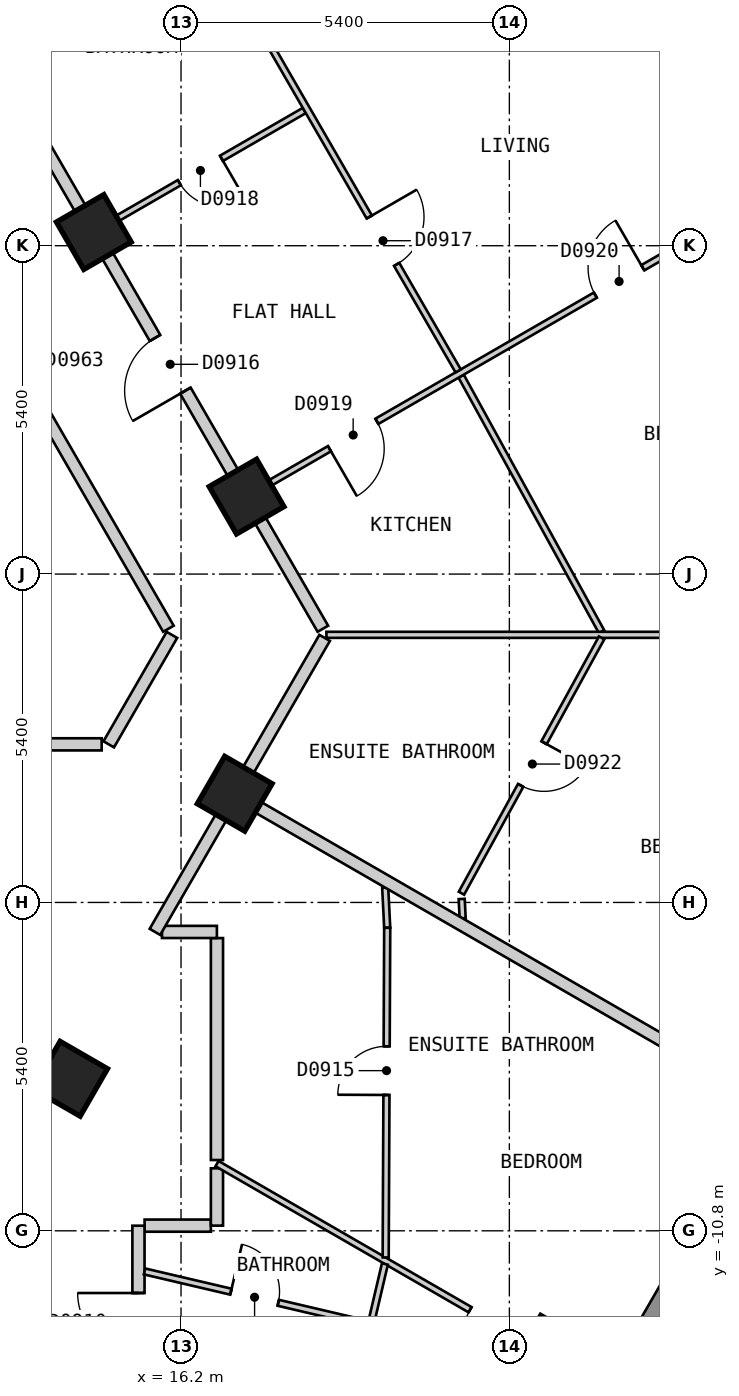
"""IFC4 building model, lengths in metres.
Left out: names, types, materials, properties, quantities, classifications, styles, units other than length and angle.
Written with IfcOpenShell. Run it as: python <this file> out.ifc"""

import sys

from ifc_helpers import new_model, si_unit, direction, frame, frame_2d, origin, origin_2d, place, context, subcontext, project, spatial, polyline, rectangle, outline, extrude, element, fill, save


model = new_model("IFC4")
c1 = context("Model", 3, precision=1e-05, world=origin(), true_north=direction((0.0, 1.0)))
c2 = subcontext(c1, "Body", "Model", "MODEL_VIEW")
j1 = project(units=[si_unit("LENGTHUNIT", "METRE"), si_unit("PLANEANGLEUNIT", "RADIAN")], contexts=[c1])
p1 = place(None, origin())
s1 = spatial("IfcSite", under=j1, at=p1, CompositionType="ELEMENT")
p2 = place(p1, origin())
s2 = spatial("IfcBuilding", under=s1, at=p2, CompositionType="ELEMENT")
p3 = place(p2, frame((0.0, 0.0, 90.0)))
s3 = spatial("IfcBuildingStorey", under=s2, at=p3, CompositionType="ELEMENT", Elevation=90.0)
p4 = place(p3, frame((22.3, -12.875, 0.0), z_axis=(0.0, 0.0, 1.0), x_axis=(0.5, 0.866025403784, 0.0)))
e1 = element("IfcColumn", 1, at=p4, inside=s3, PredefinedType="COLUMN", context=c2, shape_type="SweptSolid", body=[
    extrude(rectangle(XDim=1.0, YDim=1.0, at=origin_2d()), origin(), (0.0, 0.0, 1.0), 3.0),
])
for number, where, z_axis, x_axis in (
    (2, (14.376, -8.3, 0.0), (0.0, 0.0, 1.0), (0.5, 0.866, 0.0)),
    (3, (17.083, -3.612, 0.0), (0.0, 0.0, 1.0), (0.5, 0.866, 0.0)),
    (4, (17.278, 1.274, 0.0), (0.0, 0.0, 1.0), (-0.5, 0.866, 0.0)),
    (5, (14.766, 5.625, 0.0), (0.0, 0.0, 1.0), (-0.5, 0.866, 0.0)),
):
    element("IfcColumn", number, at=place(p3, frame(where, z_axis=z_axis, x_axis=x_axis)), inside=s3, PredefinedType="COLUMN", context=c2, shape_type="SweptSolid", body=[
        extrude(rectangle(XDim=0.9, YDim=0.9, at=origin_2d()), origin(), (0.0, 0.0, 1.0), 3.0),
    ])
p5 = place(p3, frame((17.479, -23.425, 0.0), z_axis=(0.0, 0.0, 1.0), x_axis=(0.500035407905, 0.866004960056, 0.0)))
e6 = element("IfcWall", 6, at=p5, inside=s3, PredefinedType="SOLIDWALL", context=c2, shape_type="SweptSolid", body=[
    extrude(outline(polyline([(0.0, -0.15), (23.094, -0.15), (23.014, 0.15), (0.08, 0.15), (0.0, -0.15)])), origin(), (0.0, 0.0, 1.0), 2.7),
])
p6 = place(p5, frame((2.677, 0.0, 0.15)))
e7 = element("IfcOpeningElement", 7, at=p6, cuts=e6, PredefinedType="OPENING", context=c2, shape_type="SweptSolid", body=[
    extrude(rectangle(XDim=1.5, YDim=2.1, at=frame_2d((0.75, 1.05))), frame((0.0, 0.16, 0.0), z_axis=(0.0, -1.0, 0.0), x_axis=(1.0, 0.0, 0.0)), (0.0, 0.0, 1.0), 0.32),
])
p7 = place(p5, frame((8.091, 0.0, 0.15)))
e8 = element("IfcOpeningElement", 8, at=p7, cuts=e6, PredefinedType="OPENING", context=c2, shape_type="SweptSolid", body=[
    extrude(rectangle(XDim=1.5, YDim=2.1, at=frame_2d((0.75, 1.05))), frame((0.0, 0.16, 0.0), z_axis=(0.0, -1.0, 0.0), x_axis=(1.0, 0.0, 0.0)), (0.0, 0.0, 1.0), 0.32),
])
p8 = place(p5, frame((13.504, 0.0, 0.15)))
e9 = element("IfcOpeningElement", 9, at=p8, cuts=e6, PredefinedType="OPENING", context=c2, shape_type="SweptSolid", body=[
    extrude(rectangle(XDim=1.5, YDim=2.1, at=frame_2d((0.75, 1.05))), frame((0.0, 0.16, 0.0), z_axis=(0.0, -1.0, 0.0), x_axis=(1.0, 0.0, 0.0)), (0.0, 0.0, 1.0), 0.32),
])
p9 = place(p5, frame((18.917, 0.0, 0.15)))
e10 = element("IfcOpeningElement", 10, at=p9, cuts=e6, PredefinedType="OPENING", context=c2, shape_type="SweptSolid", body=[
    extrude(rectangle(XDim=1.5, YDim=2.1, at=frame_2d((0.75, 1.05))), frame((0.0, 0.16, 0.0), z_axis=(0.0, -1.0, 0.0), x_axis=(1.0, 0.0, 0.0)), (0.0, 0.0, 1.0), 0.32),
])
p10 = place(p3, frame((29.027, 1.425, 0.0), z_axis=(0.0, 0.0, 1.0), x_axis=(-0.500027479704, 0.866009537788, 0.0)))
e11 = element("IfcWall", 11, at=p10, inside=s3, PredefinedType="SOLIDWALL", context=c2, shape_type="SweptSolid", body=[
    extrude(outline(polyline([(0.0, -0.15), (26.559, -0.15), (26.478, 0.15), (0.08, 0.15), (0.0, -0.15)])), origin(), (0.0, 0.0, 1.0), 2.7),
])
p11 = place(p10, frame((2.483, 0.0, 0.15)))
e12 = element("IfcOpeningElement", 12, at=p11, cuts=e11, PredefinedType="OPENING", context=c2, shape_type="SweptSolid", body=[
    extrude(rectangle(XDim=1.5, YDim=2.1, at=frame_2d((0.75, 1.05))), frame((0.0, 0.16, 0.0), z_axis=(0.0, -1.0, 0.0), x_axis=(1.0, 0.0, 0.0)), (0.0, 0.0, 1.0), 0.32),
])
p12 = place(p10, frame((7.506, 0.0, 0.15)))
e13 = element("IfcOpeningElement", 13, at=p12, cuts=e11, PredefinedType="OPENING", context=c2, shape_type="SweptSolid", body=[
    extrude(rectangle(XDim=1.5, YDim=2.1, at=frame_2d((0.75, 1.05))), frame((0.0, 0.16, 0.0), z_axis=(0.0, -1.0, 0.0), x_axis=(1.0, 0.0, 0.0)), (0.0, 0.0, 1.0), 0.32),
])
p13 = place(p10, frame((12.529, 0.0, 0.15)))
e14 = element("IfcOpeningElement", 14, at=p13, cuts=e11, PredefinedType="OPENING", context=c2, shape_type="SweptSolid", body=[
    extrude(rectangle(XDim=1.5, YDim=2.1, at=frame_2d((0.75, 1.05))), frame((0.0, 0.16, 0.0), z_axis=(0.0, -1.0, 0.0), x_axis=(1.0, 0.0, 0.0)), (0.0, 0.0, 1.0), 0.32),
])
p14 = place(p10, frame((17.552, 0.0, 0.15)))
e15 = element("IfcOpeningElement", 15, at=p14, cuts=e11, PredefinedType="OPENING", context=c2, shape_type="SweptSolid", body=[
    extrude(rectangle(XDim=1.5, YDim=2.1, at=frame_2d((0.75, 1.05))), frame((0.0, 0.16, 0.0), z_axis=(0.0, -1.0, 0.0), x_axis=(1.0, 0.0, 0.0)), (0.0, 0.0, 1.0), 0.32),
])
p15 = place(p10, frame((22.575, 0.0, 0.15)))
e16 = element("IfcOpeningElement", 16, at=p15, cuts=e11, PredefinedType="OPENING", context=c2, shape_type="SweptSolid", body=[
    extrude(rectangle(XDim=1.5, YDim=2.1, at=frame_2d((0.75, 1.05))), frame((0.0, 0.16, 0.0), z_axis=(0.0, -1.0, 0.0), x_axis=(1.0, 0.0, 0.0)), (0.0, 0.0, 1.0), 0.32),
])
p16 = place(p3, frame((10.913, 7.899, 0.0), z_axis=(0.0, 0.0, 1.0), x_axis=(0.500028940566, -0.866008694296, 0.0)))
e17 = element("IfcWall", 17, at=p16, inside=s3, PredefinedType="PARTITIONING", context=c2, shape_type="SweptSolid", body=[
    extrude(rectangle(XDim=10.159, YDim=0.2, at=frame_2d((5.08, 0.0))), origin(), (0.0, 0.0, 1.0), 2.7),
])
p17 = place(p16, frame((4.63, 0.0, 0.0)))
e18 = element("IfcOpeningElement", 18, at=p17, cuts=e17, PredefinedType="OPENING", context=c2, shape_type="SweptSolid", body=[
    extrude(rectangle(XDim=0.9, YDim=2.1, at=frame_2d((0.45, 1.05))), frame((0.0, 0.11, 0.0), z_axis=(0.0, -1.0, 0.0), x_axis=(1.0, 0.0, 0.0)), (0.0, 0.0, 1.0), 0.22),
])
p18 = place(p3, frame((8.488, 16.5, 0.0), z_axis=(0.0, 0.0, 1.0), x_axis=(0.499986836607, -0.86603300354, 0.0)))
e19 = element("IfcWall", 19, at=p18, inside=s3, PredefinedType="PARTITIONING", context=c2, shape_type="SweptSolid", body=[
    extrude(rectangle(XDim=20.09, YDim=0.2, at=frame_2d((10.045, 0.0))), origin(), (0.0, 0.0, 1.0), 2.7),
])
p19 = place(p18, frame((14.569, 0.0, 0.0)))
e20 = element("IfcOpeningElement", 20, at=p19, cuts=e19, PredefinedType="OPENING", context=c2, shape_type="SweptSolid", body=[
    extrude(rectangle(XDim=1.0, YDim=2.1, at=frame_2d((0.5, 1.05))), frame((0.0, 0.11, 0.0), z_axis=(0.0, -1.0, 0.0), x_axis=(1.0, 0.0, 0.0)), (0.0, 0.0, 1.0), 0.22),
])
p20 = place(p18, frame((4.547, 0.0, 0.0)))
e21 = element("IfcOpeningElement", 21, at=p20, cuts=e19, PredefinedType="OPENING", context=c2, shape_type="SweptSolid", body=[
    extrude(rectangle(XDim=1.0, YDim=2.1, at=frame_2d((0.5, 1.05))), frame((0.0, 0.11, 0.0), z_axis=(0.0, -1.0, 0.0), x_axis=(1.0, 0.0, 0.0)), (0.0, 0.0, 1.0), 0.22),
])
p21 = place(p3, frame((16.791, -5.986, 0.0), z_axis=(0.0, 0.0, 1.0), x_axis=(0.0, -1.0, 0.0)))
e22 = element("IfcWall", 22, at=p21, inside=s3, PredefinedType="PARTITIONING", context=c2, shape_type="SweptSolid", body=[
    extrude(rectangle(XDim=3.65, YDim=0.2, at=frame_2d((1.825, 0.0))), origin(), (0.0, 0.0, 1.0), 2.7),
])
p22 = place(p3, frame((15.887, -5.885, 0.0), z_axis=(0.0, 0.0, 1.0), x_axis=(1.0, 0.0, 0.0)))
e23 = element("IfcWall", 23, at=p22, inside=s3, PredefinedType="PARTITIONING", context=c2, shape_type="SweptSolid", body=[
    extrude(rectangle(XDim=0.903, YDim=0.2, at=frame_2d((0.452, 0.0))), origin(), (0.0, 0.0, 1.0), 2.7),
])
p23 = place(p3, frame((15.601, -10.715, 0.0), z_axis=(0.0, 0.0, 1.0), x_axis=(1.0, 0.0, 0.0)))
e24 = element("IfcWall", 24, at=p23, inside=s3, PredefinedType="PARTITIONING", context=c2, shape_type="SweptSolid", body=[
    extrude(rectangle(XDim=1.09, YDim=0.2, at=frame_2d((0.545, 0.0))), origin(), (0.0, 0.0, 1.0), 2.7),
])
p24 = place(p3, frame((6.929, -2.8, 0.0), z_axis=(0.0, 0.0, 1.0), x_axis=(1.0, 0.0, 0.0)))
e25 = element("IfcWall", 25, at=p24, inside=s3, PredefinedType="PARTITIONING", context=c2, shape_type="SweptSolid", body=[
    extrude(rectangle(XDim=7.966, YDim=0.2, at=frame_2d((3.983, 0.0))), origin(), (0.0, 0.0, 1.0), 2.7),
])
p25 = place(p3, frame((15.011, -2.8, 0.0), z_axis=(0.0, 0.0, 1.0), x_axis=(0.499929208183, 0.866066271601, 0.0)))
e26 = element("IfcWall", 26, at=p25, inside=s3, PredefinedType="PARTITIONING", context=c2, shape_type="SweptSolid", body=[
    extrude(rectangle(XDim=2.078, YDim=0.2, at=frame_2d((1.039, 0.0))), origin(), (0.0, 0.0, 1.0), 2.7),
])
p26 = place(p3, frame((15.771, -5.884, 0.0), z_axis=(0.0, 0.0, 1.0), x_axis=(0.499939494019, 0.866060334111, 0.0)))
e27 = element("IfcWall", 27, at=p26, inside=s3, PredefinedType="PARTITIONING", context=c2, shape_type="SweptSolid", body=[
    extrude(rectangle(XDim=5.583, YDim=0.2, at=frame_2d((2.792, 0.0))), origin(), (0.0, 0.0, 1.0), 2.7),
])
p27 = place(p3, frame((15.5, -13.136, 0.0), z_axis=(0.0, 0.0, 1.0), x_axis=(0.0, 1.0, 0.0)))
e28 = element("IfcWall", 28, at=p27, inside=s3, PredefinedType="PARTITIONING", context=c2, shape_type="SweptSolid", body=[
    extrude(rectangle(XDim=2.42, YDim=0.2, at=frame_2d((1.21, 0.0))), origin(), (0.0, 0.0, 1.0), 2.7),
])
p28 = place(p27, frame((0.313, 0.0, 0.0)))
e29 = element("IfcOpeningElement", 29, at=p28, cuts=e28, PredefinedType="OPENING", context=c2, shape_type="SweptSolid", body=[
    extrude(rectangle(XDim=1.0, YDim=2.1, at=frame_2d((0.5, 1.05))), frame((0.0, 0.11, 0.0), z_axis=(0.0, -1.0, 0.0), x_axis=(1.0, 0.0, 0.0)), (0.0, 0.0, 1.0), 0.22),
])
p29 = place(p3, frame((16.791, -10.715, 0.0), z_axis=(0.0, 0.0, 1.0), x_axis=(0.0, 1.0, 0.0)))
e30 = element("IfcWall", 30, at=p29, inside=s3, PredefinedType="PARTITIONING", context=c2, shape_type="SweptSolid", body=[
    extrude(rectangle(XDim=0.943, YDim=0.2, at=frame_2d((0.472, 0.0))), origin(), (0.0, 0.0, 1.0), 2.7),
])
p30 = place(p3, frame((20.807, 3.255, 0.0), z_axis=(0.0, 0.0, 1.0), x_axis=(0.481604009855, -0.876388942018, 0.0)))
e31 = element("IfcWall", 31, at=p30, inside=s3, PredefinedType="PARTITIONING", context=c2, shape_type="SweptSolid", body=[
    extrude(rectangle(XDim=4.795, YDim=0.1, at=frame_2d((2.397, 0.0))), origin(), (0.0, 0.0, 1.0), 2.7),
])
p31 = place(p3, frame((19.558, -5.156, 0.0), z_axis=(0.0, 0.0, 1.0), x_axis=(0.04980880462, -0.998758771167, 0.0)))
e32 = element("IfcWall", 32, at=p31, inside=s3, PredefinedType="PARTITIONING", context=c2, shape_type="SweptSolid", body=[
    extrude(rectangle(XDim=0.662, YDim=0.1, at=frame_2d((0.331, 0.0))), origin(), (0.0, 0.0, 1.0), 2.7),
])
p32 = place(p3, frame((20.816, -5.343, 0.0), z_axis=(0.0, 0.0, 1.0), x_axis=(0.050626241319, -0.998717669659, 0.0)))
e33 = element("IfcWall", 33, at=p32, inside=s3, PredefinedType="PARTITIONING", context=c2, shape_type="SweptSolid", body=[
    extrude(rectangle(XDim=0.318, YDim=0.1, at=frame_2d((0.159, 0.0))), origin(), (0.0, 0.0, 1.0), 2.7),
])
p33 = place(p3, frame((15.6, -11.468, 0.0), z_axis=(0.0, 0.0, 1.0), x_axis=(0.973574036597, -0.228371616592, 0.0)))
e34 = element("IfcWall", 34, at=p33, inside=s3, PredefinedType="PARTITIONING", context=c2, shape_type="SweptSolid", body=[
    extrude(rectangle(XDim=3.771, YDim=0.1, at=frame_2d((1.885, 0.0))), origin(), (0.0, 0.0, 1.0), 2.7),
])
p34 = place(p33, frame((1.459, 0.0, 0.0)))
e35 = element("IfcOpeningElement", 35, at=p34, cuts=e34, PredefinedType="OPENING", context=c2, shape_type="SweptSolid", body=[
    extrude(rectangle(XDim=0.8, YDim=2.1, at=frame_2d((0.4, 1.05))), frame((0.0, 0.06, 0.0), z_axis=(0.0, -1.0, 0.0), x_axis=(1.0, 0.0, 0.0)), (0.0, 0.0, 1.0), 0.12),
])
p35 = place(p3, frame((16.792, -9.695, 0.0), z_axis=(0.0, 0.0, 1.0), x_axis=(0.86603765469, -0.499978780208, 0.0)))
e36 = element("IfcWall", 36, at=p35, inside=s3, PredefinedType="PARTITIONING", context=c2, shape_type="SweptSolid", body=[
    extrude(rectangle(XDim=7.31, YDim=0.1, at=frame_2d((3.655, 0.0))), origin(), (0.0, 0.0, 1.0), 2.7),
])
p36 = place(p35, frame((4.806, 0.0, 0.0)))
e37 = element("IfcOpeningElement", 37, at=p36, cuts=e36, PredefinedType="OPENING", context=c2, shape_type="SweptSolid", body=[
    extrude(rectangle(XDim=0.9, YDim=2.1, at=frame_2d((0.45, 1.05))), frame((0.0, 0.06, 0.0), z_axis=(0.0, -1.0, 0.0), x_axis=(1.0, 0.0, 0.0)), (0.0, 0.0, 1.0), 0.12),
])
p37 = place(p3, frame((18.591, -0.999, 0.0), z_axis=(0.0, 0.0, 1.0), x_axis=(1.0, 0.0, 0.0)))
e38 = element("IfcWall", 38, at=p37, inside=s3, PredefinedType="PARTITIONING", context=c2, shape_type="SweptSolid", body=[
    extrude(rectangle(XDim=10.266, YDim=0.1, at=frame_2d((5.133, 0.0))), origin(), (0.0, 0.0, 1.0), 2.7),
])
p38 = place(p37, frame((7.079, 0.0, 0.0)))
e39 = element("IfcOpeningElement", 39, at=p38, cuts=e38, PredefinedType="OPENING", context=c2, shape_type="SweptSolid", body=[
    extrude(rectangle(XDim=0.9, YDim=2.1, at=frame_2d((0.45, 1.05))), frame((0.0, 0.06, 0.0), z_axis=(0.0, -1.0, 0.0), x_axis=(1.0, 0.0, 0.0)), (0.0, 0.0, 1.0), 0.12),
])
p39 = place(p3, frame((20.812, -5.248, 0.0), z_axis=(0.0, 0.0, 1.0), x_axis=(0.481196609449, 0.876612698434, 0.0)))
e40 = element("IfcWall", 40, at=p39, inside=s3, PredefinedType="PARTITIONING", context=c2, shape_type="SweptSolid", body=[
    extrude(rectangle(XDim=4.79, YDim=0.1, at=frame_2d((2.395, 0.0))), origin(), (0.0, 0.0, 1.0), 2.7),
])
p40 = place(p39, frame((2.023, 0.0, 0.0)))
e41 = element("IfcOpeningElement", 41, at=p40, cuts=e40, PredefinedType="OPENING", context=c2, shape_type="SweptSolid", body=[
    extrude(rectangle(XDim=0.8, YDim=2.1, at=frame_2d((0.4, 1.05))), frame((0.0, 0.06, 0.0), z_axis=(0.0, -1.0, 0.0), x_axis=(1.0, 0.0, 0.0)), (0.0, 0.0, 1.0), 0.12),
])
p41 = place(p3, frame((18.933, -13.991, 0.0), z_axis=(0.0, 0.0, 1.0), x_axis=(0.228172687949, 0.97362067792, 0.0)))
e42 = element("IfcWall", 42, at=p41, inside=s3, PredefinedType="PARTITIONING", context=c2, shape_type="SweptSolid", body=[
    extrude(rectangle(XDim=2.717, YDim=0.1, at=frame_2d((1.358, 0.0))), origin(), (0.0, 0.0, 1.0), 2.7),
])
p42 = place(p3, frame((19.566, -11.238, 0.0), z_axis=(0.0, 0.0, 1.0), x_axis=(0.004638545009, 0.999989241892, 0.0)))
e43 = element("IfcWall", 43, at=p42, inside=s3, PredefinedType="PARTITIONING", context=c2, shape_type="SweptSolid", body=[
    extrude(rectangle(XDim=5.421, YDim=0.1, at=frame_2d((2.71, 0.0))), origin(), (0.0, 0.0, 1.0), 2.7),
])
p43 = place(p42, frame((2.672, 0.0, 0.0)))
e44 = element("IfcOpeningElement", 44, at=p43, cuts=e43, PredefinedType="OPENING", context=c2, shape_type="SweptSolid", body=[
    extrude(rectangle(XDim=0.8, YDim=2.1, at=frame_2d((0.4, 1.05))), frame((0.0, 0.06, 0.0), z_axis=(0.0, -1.0, 0.0), x_axis=(1.0, 0.0, 0.0)), (0.0, 0.0, 1.0), 0.12),
])
p44 = place(p3, frame((17.365, 1.325, 0.0), z_axis=(0.0, 0.0, 1.0), x_axis=(0.866016855193, 0.500014806302, 0.0)))
e45 = element("IfcWall", 45, at=p44, inside=s3, PredefinedType="PARTITIONING", context=c2, shape_type="SweptSolid", body=[
    extrude(rectangle(XDim=10.0, YDim=0.1, at=frame_2d((5.0, 0.0))), origin(), (0.0, 0.0, 1.0), 2.7),
])
p45 = place(p44, frame((1.474, 0.0, 0.0)))
e46 = element("IfcOpeningElement", 46, at=p45, cuts=e45, PredefinedType="OPENING", context=c2, shape_type="SweptSolid", body=[
    extrude(rectangle(XDim=0.9, YDim=2.1, at=frame_2d((0.45, 1.05))), frame((0.0, 0.06, 0.0), z_axis=(0.0, -1.0, 0.0), x_axis=(1.0, 0.0, 0.0)), (0.0, 0.0, 1.0), 0.12),
])
p46 = place(p44, frame((6.524, 0.0, 0.0)))
e47 = element("IfcOpeningElement", 47, at=p46, cuts=e45, PredefinedType="OPENING", context=c2, shape_type="SweptSolid", body=[
    extrude(rectangle(XDim=0.9, YDim=2.1, at=frame_2d((0.45, 1.05))), frame((0.0, 0.06, 0.0), z_axis=(0.0, -1.0, 0.0), x_axis=(1.0, 0.0, 0.0)), (0.0, 0.0, 1.0), 0.12),
])
p47 = place(p3, frame((14.853, 5.675, 0.0), z_axis=(0.0, 0.0, 1.0), x_axis=(0.865979019114, 0.500080332001, 0.0)))
e48 = element("IfcWall", 48, at=p47, inside=s3, PredefinedType="PARTITIONING", context=c2, shape_type="SweptSolid", body=[
    extrude(rectangle(XDim=3.897, YDim=0.1, at=frame_2d((1.949, 0.0))), origin(), (0.0, 0.0, 1.0), 2.7),
])
p48 = place(p47, frame((1.524, 0.0, 0.0)))
e49 = element("IfcOpeningElement", 49, at=p48, cuts=e48, PredefinedType="OPENING", context=c2, shape_type="SweptSolid", body=[
    extrude(rectangle(XDim=0.8, YDim=2.1, at=frame_2d((0.4, 1.05))), frame((0.0, 0.06, 0.0), z_axis=(0.0, -1.0, 0.0), x_axis=(1.0, 0.0, 0.0)), (0.0, 0.0, 1.0), 0.12),
])
p49 = place(p3, frame((17.169, -3.662, 0.0), z_axis=(0.0, 0.0, 1.0), x_axis=(0.866047370643, -0.499961950354, 0.0)))
e50 = element("IfcWall", 50, at=p49, inside=s3, PredefinedType="PARTITIONING", context=c2, shape_type="SweptSolid", body=[
    extrude(rectangle(XDim=10.001, YDim=0.2, at=frame_2d((5.0, 0.0))), origin(), (0.0, 0.0, 1.0), 2.7),
])
p50 = place(p3, frame((15.759, 11.998, 0.0), z_axis=(0.0, 0.0, 1.0), x_axis=(0.500068444113, -0.865985883951, 0.0)))
e51 = element("IfcWall", 51, at=p50, inside=s3, PredefinedType="PARTITIONING", context=c2, shape_type="SweptSolid", body=[
    extrude(rectangle(XDim=9.997, YDim=0.1, at=frame_2d((4.998, 0.0))), origin(), (0.0, 0.0, 1.0), 2.7),
])
p51 = place(p50, frame((7.074, 0.0, 0.0)))
e52 = element("IfcOpeningElement", 52, at=p51, cuts=e51, PredefinedType="OPENING", context=c2, shape_type="SweptSolid", body=[
    extrude(rectangle(XDim=0.9, YDim=2.1, at=frame_2d((0.45, 1.05))), frame((0.0, 0.06, 0.0), z_axis=(0.0, -1.0, 0.0), x_axis=(1.0, 0.0, 0.0)), (0.0, 0.0, 1.0), 0.12),
])
p52 = place(p28, origin())
e53 = element("IfcDoor", 53, at=p52, inside=s3, OperationType="SINGLE_SWING_RIGHT", PredefinedType="DOOR", context=c2, shape_type="SweptSolid", body=[
    extrude(rectangle(XDim=1.0, YDim=2.1, at=frame_2d((0.5, 1.05))), frame((0.0, 0.025, 0.0), z_axis=(0.0, -1.0, 0.0), x_axis=(1.0, 0.0, 0.0)), (0.0, 0.0, 1.0), 0.05),
])
fill(e29, e53)
p53 = place(p34, origin())
e54 = element("IfcDoor", 54, at=p53, inside=s3, OperationType="SINGLE_SWING_LEFT", PredefinedType="DOOR", context=c2, shape_type="SweptSolid", body=[
    extrude(rectangle(XDim=0.8, YDim=2.1, at=frame_2d((0.4, 1.05))), frame((0.0, 0.025, 0.0), z_axis=(0.0, -1.0, 0.0), x_axis=(1.0, 0.0, 0.0)), (0.0, 0.0, 1.0), 0.05),
])
fill(e35, e54)
p54 = place(p36, origin())
e55 = element("IfcDoor", 55, at=p54, inside=s3, OperationType="SINGLE_SWING_RIGHT", PredefinedType="DOOR", context=c2, shape_type="SweptSolid", body=[
    extrude(rectangle(XDim=0.9, YDim=2.1, at=frame_2d((0.45, 1.05))), frame((0.0, 0.025, 0.0), z_axis=(0.0, -1.0, 0.0), x_axis=(1.0, 0.0, 0.0)), (0.0, 0.0, 1.0), 0.05),
])
fill(e37, e55)
p55 = place(p43, origin())
e56 = element("IfcDoor", 56, at=p55, inside=s3, OperationType="SINGLE_SWING_LEFT", PredefinedType="DOOR", context=c2, shape_type="SweptSolid", body=[
    extrude(rectangle(XDim=0.8, YDim=2.1, at=frame_2d((0.4, 1.05))), frame((0.0, 0.025, 0.0), z_axis=(0.0, -1.0, 0.0), x_axis=(1.0, 0.0, 0.0)), (0.0, 0.0, 1.0), 0.05),
])
fill(e44, e56)
p56 = place(p19, origin())
e57 = element("IfcDoor", 57, at=p56, inside=s3, OperationType="SINGLE_SWING_RIGHT", PredefinedType="DOOR", context=c2, shape_type="SweptSolid", body=[
    extrude(rectangle(XDim=1.0, YDim=2.1, at=frame_2d((0.5, 1.05))), frame((0.0, 0.025, 0.0), z_axis=(0.0, -1.0, 0.0), x_axis=(1.0, 0.0, 0.0)), (0.0, 0.0, 1.0), 0.05),
])
fill(e20, e57)
p57 = place(p51, origin())
e58 = element("IfcDoor", 58, at=p57, inside=s3, OperationType="SINGLE_SWING_LEFT", PredefinedType="DOOR", context=c2, shape_type="SweptSolid", body=[
    extrude(rectangle(XDim=0.9, YDim=2.1, at=frame_2d((0.45, 1.05))), frame((0.0, 0.025, 0.0), z_axis=(0.0, -1.0, 0.0), x_axis=(1.0, 0.0, 0.0)), (0.0, 0.0, 1.0), 0.05),
])
fill(e52, e58)
p58 = place(p48, origin())
e59 = element("IfcDoor", 59, at=p58, inside=s3, OperationType="SINGLE_SWING_RIGHT", PredefinedType="DOOR", context=c2, shape_type="SweptSolid", body=[
    extrude(rectangle(XDim=0.8, YDim=2.1, at=frame_2d((0.4, 1.05))), frame((0.0, 0.025, 0.0), z_axis=(0.0, -1.0, 0.0), x_axis=(1.0, 0.0, 0.0)), (0.0, 0.0, 1.0), 0.05),
])
fill(e49, e59)
p59 = place(p45, origin())
e60 = element("IfcDoor", 60, at=p59, inside=s3, OperationType="SINGLE_SWING_LEFT", PredefinedType="DOOR", context=c2, shape_type="SweptSolid", body=[
    extrude(rectangle(XDim=0.9, YDim=2.1, at=frame_2d((0.45, 1.05))), frame((0.0, 0.025, 0.0), z_axis=(0.0, -1.0, 0.0), x_axis=(1.0, 0.0, 0.0)), (0.0, 0.0, 1.0), 0.05),
])
fill(e46, e60)
p60 = place(p46, origin())
e61 = element("IfcDoor", 61, at=p60, inside=s3, OperationType="SINGLE_SWING_RIGHT", PredefinedType="DOOR", context=c2, shape_type="SweptSolid", body=[
    extrude(rectangle(XDim=0.9, YDim=2.1, at=frame_2d((0.45, 1.05))), frame((0.0, 0.025, 0.0), z_axis=(0.0, -1.0, 0.0), x_axis=(1.0, 0.0, 0.0)), (0.0, 0.0, 1.0), 0.05),
])
fill(e47, e61)
p61 = place(p40, origin())
e62 = element("IfcDoor", 62, at=p61, inside=s3, OperationType="SINGLE_SWING_RIGHT", PredefinedType="DOOR", context=c2, shape_type="SweptSolid", body=[
    extrude(rectangle(XDim=0.8, YDim=2.1, at=frame_2d((0.4, 1.05))), frame((0.0, 0.025, 0.0), z_axis=(0.0, -1.0, 0.0), x_axis=(1.0, 0.0, 0.0)), (0.0, 0.0, 1.0), 0.05),
])
fill(e41, e62)
save(model, sys.argv[1])
